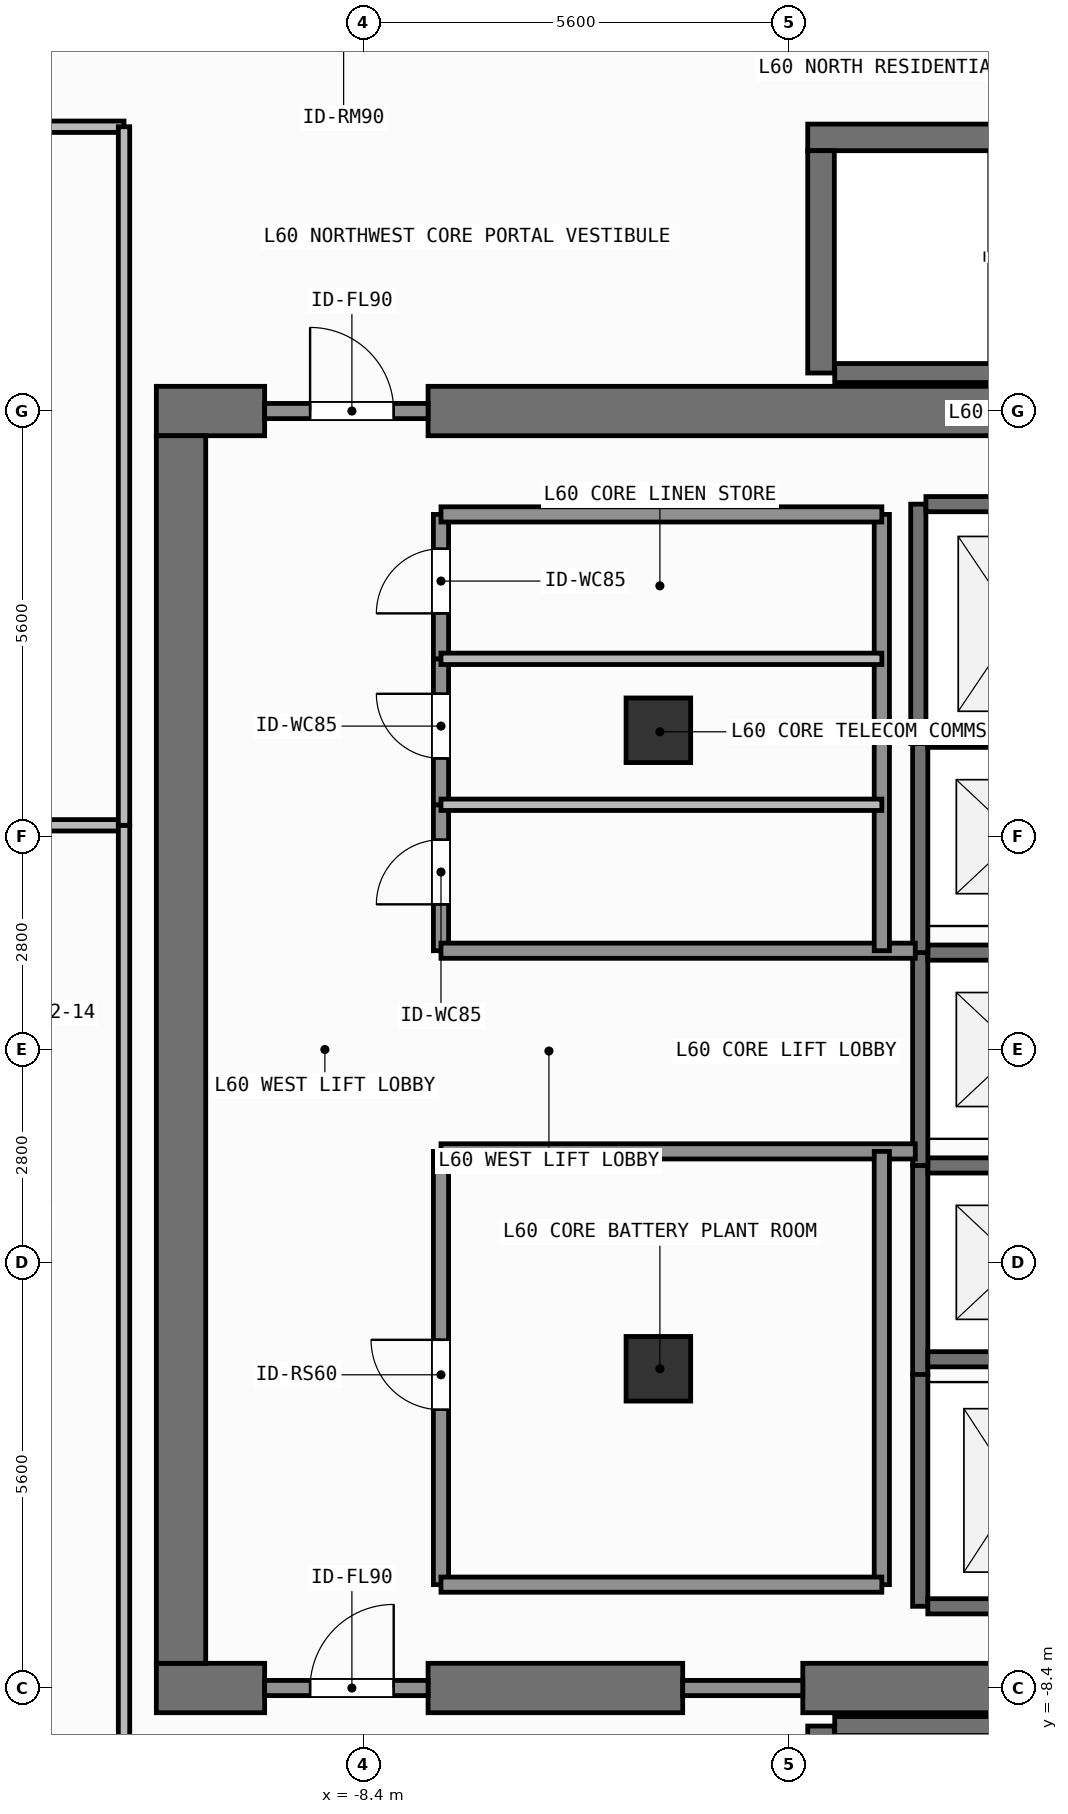
"""IFC4 building model, lengths in metres.
Left out: names, types, materials, properties, quantities, classifications, styles, units other than length and angle.
Written with IfcOpenShell. Run it as: python <this file> out.ifc"""

import sys

from ifc_helpers import new_model, si_unit, direction, frame, frame_2d, origin, origin_2d, place, context, subcontext, project, spatial, rectangle, extrude, element, fill, save


model = new_model("IFC4")
c1 = context("Model", 3, precision=1e-05, world=origin(), true_north=direction((0.0, 1.0)))
c2 = subcontext(c1, "Body", "Model", "MODEL_VIEW")
j1 = project(units=[si_unit("LENGTHUNIT", "METRE"), si_unit("PLANEANGLEUNIT", "RADIAN")], contexts=[c1])
p1 = place(None, origin())
s1 = spatial("IfcSite", under=j1, at=p1, CompositionType="ELEMENT")
p2 = place(p1, origin())
s2 = spatial("IfcBuilding", under=s1, at=p2, CompositionType="ELEMENT")
p3 = place(p2, frame((0.0, 0.0, 246.9)))
s3 = spatial("IfcBuildingStorey", under=s2, at=p3, CompositionType="ELEMENT", Elevation=246.9)
p4 = place(p3, frame((-11.125, -8.4, 0.0), z_axis=(0.0, 0.0, 1.0), x_axis=(1.0, 0.0, 0.0)))
e1 = element("IfcWall", 1, at=p4, inside=s3, PredefinedType="SHEAR", context=c2, shape_type="SweptSolid", body=[
    extrude(rectangle(XDim=1.425, YDim=0.65, at=frame_2d((0.712, 0.0))), origin(), (0.0, 0.0, 1.0), 3.9),
])
p5 = place(p3, frame((-7.55, -8.4, 0.0), z_axis=(0.0, 0.0, 1.0), x_axis=(1.0, 0.0, 0.0)))
e2 = element("IfcWall", 2, at=p5, inside=s3, PredefinedType="SHEAR", context=c2, shape_type="SweptSolid", body=[
    extrude(rectangle(XDim=3.35, YDim=0.65, at=frame_2d((1.675, 0.0))), origin(), (0.0, 0.0, 1.0), 3.9),
])
p6 = place(p3, frame((-2.62, -8.4, 0.0), z_axis=(0.0, 0.0, 1.0), x_axis=(1.0, 0.0, 0.0)))
e3 = element("IfcWall", 3, at=p6, inside=s3, PredefinedType="SHEAR", context=c2, shape_type="SweptSolid", body=[
    extrude(rectangle(XDim=7.27, YDim=0.65, at=frame_2d((3.635, 0.0))), origin(), (0.0, 0.0, 1.0), 3.9),
])
p7 = place(p3, frame((-11.125, 8.4, 0.0), z_axis=(0.0, 0.0, 1.0), x_axis=(1.0, 0.0, 0.0)))
e4 = element("IfcWall", 4, at=p7, inside=s3, PredefinedType="SHEAR", context=c2, shape_type="SweptSolid", body=[
    extrude(rectangle(XDim=1.425, YDim=0.65, at=frame_2d((0.712, 0.0))), origin(), (0.0, 0.0, 1.0), 3.9),
])
p8 = place(p3, frame((-7.55, 8.4, 0.0), z_axis=(0.0, 0.0, 1.0), x_axis=(1.0, 0.0, 0.0)))
e5 = element("IfcWall", 5, at=p8, inside=s3, PredefinedType="SHEAR", context=c2, shape_type="SweptSolid", body=[
    extrude(rectangle(XDim=16.275, YDim=0.65, at=frame_2d((8.138, 0.0))), origin(), (0.0, 0.0, 1.0), 3.9),
])
p9 = place(p3, frame((-10.8, -8.075, 0.0), z_axis=(0.0, 0.0, 1.0), x_axis=(0.0, 1.0, 0.0)))
e6 = element("IfcWall", 6, at=p9, inside=s3, PredefinedType="SHEAR", context=c2, shape_type="SweptSolid", body=[
    extrude(rectangle(XDim=16.15, YDim=0.65, at=frame_2d((8.075, 0.0))), origin(), (0.0, 0.0, 1.0), 3.9),
])
p10 = place(p3, frame((-2.2, -8.9, 0.0), z_axis=(0.0, 0.0, 1.0), x_axis=(1.0, 0.0, 0.0)))
e7 = element("IfcWall", 7, at=p10, inside=s3, PredefinedType="SHEAR", context=c2, shape_type="SweptSolid", body=[
    extrude(rectangle(XDim=6.6, YDim=0.25, at=frame_2d((3.3, 0.0))), origin(), (0.0, 0.0, 1.0), 3.9),
])
p11 = place(p3, frame((-2.38, -11.825, 0.0), z_axis=(0.0, 0.0, 1.0), x_axis=(0.0, 1.0, 0.0)))
e8 = element("IfcWall", 8, at=p11, inside=s3, PredefinedType="SHEAR", context=c2, shape_type="SweptSolid", body=[
    extrude(rectangle(XDim=2.925, YDim=0.35, at=frame_2d((1.462, 0.0))), origin(), (0.0, 0.0, 1.0), 3.9),
])
p12 = place(p3, frame((-2.555, 12.0, 0.0), z_axis=(0.0, 0.0, 1.0), x_axis=(1.0, 0.0, 0.0)))
e9 = element("IfcWall", 9, at=p12, inside=s3, PredefinedType="SHEAR", context=c2, shape_type="SweptSolid", body=[
    extrude(rectangle(XDim=7.31, YDim=0.35, at=frame_2d((3.655, 0.0))), origin(), (0.0, 0.0, 1.0), 3.9),
])
p13 = place(p3, frame((-2.2, 8.9, 0.0), z_axis=(0.0, 0.0, 1.0), x_axis=(1.0, 0.0, 0.0)))
e10 = element("IfcWall", 10, at=p13, inside=s3, PredefinedType="SHEAR", context=c2, shape_type="SweptSolid", body=[
    extrude(rectangle(XDim=6.6, YDim=0.25, at=frame_2d((3.3, 0.0))), origin(), (0.0, 0.0, 1.0), 3.9),
])
p14 = place(p3, frame((-2.38, 8.9, 0.0), z_axis=(0.0, 0.0, 1.0), x_axis=(0.0, 1.0, 0.0)))
e11 = element("IfcWall", 11, at=p14, inside=s3, PredefinedType="SHEAR", context=c2, shape_type="SweptSolid", body=[
    extrude(rectangle(XDim=2.925, YDim=0.35, at=frame_2d((1.462, 0.0))), origin(), (0.0, 0.0, 1.0), 3.9),
])
for number, where, z_axis, x_axis in (
    (12, (-4.52, -4.2, 0.0), (0.0, 0.0, 1.0), (1.0, 0.0, 0.0)),
    (13, (-4.52, 4.2, 0.0), (0.0, 0.0, 1.0), (1.0, 0.0, 0.0)),
):
    element("IfcColumn", number, at=place(p3, frame(where, z_axis=z_axis, x_axis=x_axis)), inside=s3, PredefinedType="COLUMN", context=c2, shape_type="SweptSolid", body=[
        extrude(rectangle(XDim=0.85, YDim=0.85, at=origin_2d()), origin(), (0.0, 0.0, 1.0), 3.9),
    ])
p15 = place(p3, frame((-1.075, -4.275, 0.0), z_axis=(0.0, 0.0, 1.0), x_axis=(0.0, 1.0, 0.0)))
e14 = element("IfcWall", 14, at=p15, inside=s3, PredefinedType="SHEAR", context=c2, shape_type="SweptSolid", body=[
    extrude(rectangle(XDim=2.75, YDim=0.2, at=frame_2d((1.375, 0.0))), origin(), (0.0, 0.0, 1.0), 3.68),
])
for number, where, z_axis, x_axis in (
    (15, (-0.975, -4.075, 0.0), (0.0, 0.0, 1.0), (1.0, 0.0, 0.0)),
    (16, (-0.975, -1.525, 0.0), (0.0, 0.0, 1.0), (1.0, 0.0, 0.0)),
):
    element("IfcWall", number, at=place(p3, frame(where, z_axis=z_axis, x_axis=x_axis)), inside=s3, PredefinedType="SHEAR", context=c2, shape_type="SweptSolid", body=[
        extrude(rectangle(XDim=2.35, YDim=0.2, at=frame_2d((1.175, 0.0))), origin(), (0.0, 0.0, 1.0), 3.68),
    ])
p16 = place(p3, frame((-1.075, -1.525, 0.0), z_axis=(0.0, 0.0, 1.0), x_axis=(0.0, 1.0, 0.0)))
e17 = element("IfcWall", 17, at=p16, inside=s3, PredefinedType="SHEAR", context=c2, shape_type="SweptSolid", body=[
    extrude(rectangle(XDim=2.8, YDim=0.2, at=frame_2d((1.4, 0.0))), origin(), (0.0, 0.0, 1.0), 3.68),
])
p17 = place(p3, frame((-0.975, 1.275, 0.0), z_axis=(0.0, 0.0, 1.0), x_axis=(1.0, 0.0, 0.0)))
e18 = element("IfcWall", 18, at=p17, inside=s3, PredefinedType="SHEAR", context=c2, shape_type="SweptSolid", body=[
    extrude(rectangle(XDim=2.35, YDim=0.2, at=frame_2d((1.175, 0.0))), origin(), (0.0, 0.0, 1.0), 3.68),
])
p18 = place(p3, frame((-1.075, 1.275, 0.0), z_axis=(0.0, 0.0, 1.0), x_axis=(0.0, 1.0, 0.0)))
e19 = element("IfcWall", 19, at=p18, inside=s3, PredefinedType="SHEAR", context=c2, shape_type="SweptSolid", body=[
    extrude(rectangle(XDim=2.8, YDim=0.2, at=frame_2d((1.4, 0.0))), origin(), (0.0, 0.0, 1.0), 3.68),
])
p19 = place(p3, frame((-0.975, 4.075, 0.0), z_axis=(0.0, 0.0, 1.0), x_axis=(1.0, 0.0, 0.0)))
e20 = element("IfcWall", 20, at=p19, inside=s3, PredefinedType="SHEAR", context=c2, shape_type="SweptSolid", body=[
    extrude(rectangle(XDim=2.35, YDim=0.2, at=frame_2d((1.175, 0.0))), origin(), (0.0, 0.0, 1.0), 3.68),
])
p20 = place(p3, frame((-1.1, 4.025, 0.0), z_axis=(0.0, 0.0, 1.0), x_axis=(0.0, 1.0, 0.0)))
e21 = element("IfcWall", 21, at=p20, inside=s3, PredefinedType="SHEAR", context=c2, shape_type="SweptSolid", body=[
    extrude(rectangle(XDim=3.15, YDim=0.2, at=frame_2d((1.575, 0.0))), origin(), (0.0, 0.0, 1.0), 3.68),
])
p21 = place(p3, frame((-1.0, 7.175, 0.0), z_axis=(0.0, 0.0, 1.0), x_axis=(1.0, 0.0, 0.0)))
e22 = element("IfcWall", 22, at=p21, inside=s3, PredefinedType="SHEAR", context=c2, shape_type="SweptSolid", body=[
    extrude(rectangle(XDim=2.4, YDim=0.2, at=frame_2d((1.2, 0.0))), origin(), (0.0, 0.0, 1.0), 3.68),
])
p22 = place(p3, frame((-1.075, -7.325, 0.0), z_axis=(0.0, 0.0, 1.0), x_axis=(0.0, 1.0, 0.0)))
e23 = element("IfcWall", 23, at=p22, inside=s3, PredefinedType="SHEAR", context=c2, shape_type="SweptSolid", body=[
    extrude(rectangle(XDim=3.05, YDim=0.2, at=frame_2d((1.525, 0.0))), origin(), (0.0, 0.0, 1.0), 3.68),
])
p23 = place(p3, frame((-0.975, -7.325, 0.0), z_axis=(0.0, 0.0, 1.0), x_axis=(1.0, 0.0, 0.0)))
e24 = element("IfcWall", 24, at=p23, inside=s3, PredefinedType="SHEAR", context=c2, shape_type="SweptSolid", body=[
    extrude(rectangle(XDim=2.35, YDim=0.2, at=frame_2d((1.175, 0.0))), origin(), (0.0, 0.0, 1.0), 3.68),
])
p24 = place(p3, frame((-9.7, -8.4, 0.0), z_axis=(0.0, 0.0, 1.0), x_axis=(1.0, 0.0, 0.0)))
e25 = element("IfcWall", 25, at=p24, inside=s3, PredefinedType="SOLIDWALL", context=c2, shape_type="SweptSolid", body=[
    extrude(rectangle(XDim=2.15, YDim=0.2, at=frame_2d((1.075, 0.0))), origin(), (0.0, 0.0, 1.0), 2.92),
])
p25 = place(p24, frame((0.598, 0.0, 0.0)))
e26 = element("IfcOpeningElement", 26, at=p25, cuts=e25, PredefinedType="OPENING", context=c2, shape_type="SweptSolid", body=[
    extrude(rectangle(XDim=1.1, YDim=2.15, at=frame_2d((0.55, 1.075))), frame((0.0, 0.11, 0.0), z_axis=(0.0, -1.0, 0.0), x_axis=(1.0, 0.0, 0.0)), (0.0, 0.0, 1.0), 0.22),
])
p26 = place(p3, frame((-9.7, 8.4, 0.0), z_axis=(0.0, 0.0, 1.0), x_axis=(1.0, 0.0, 0.0)))
e27 = element("IfcWall", 27, at=p26, inside=s3, PredefinedType="SOLIDWALL", context=c2, shape_type="SweptSolid", body=[
    extrude(rectangle(XDim=2.15, YDim=0.2, at=frame_2d((1.075, 0.0))), origin(), (0.0, 0.0, 1.0), 2.92),
])
p27 = place(p26, frame((0.598, 0.0, 0.0)))
e28 = element("IfcOpeningElement", 28, at=p27, cuts=e27, PredefinedType="OPENING", context=c2, shape_type="SweptSolid", body=[
    extrude(rectangle(XDim=1.1, YDim=2.15, at=frame_2d((0.55, 1.075))), frame((0.0, 0.11, 0.0), z_axis=(0.0, -1.0, 0.0), x_axis=(1.0, 0.0, 0.0)), (0.0, 0.0, 1.0), 0.22),
])
p28 = place(p3, frame((-7.38, -7.04, 0.0), z_axis=(0.0, 0.0, 1.0), x_axis=(0.0, 1.0, 0.0)))
e29 = element("IfcWall", 29, at=p28, inside=s3, PredefinedType="SOLIDWALL", context=c2, shape_type="SweptSolid", body=[
    extrude(rectangle(XDim=5.7, YDim=0.2, at=frame_2d((2.85, 0.0))), origin(), (0.0, 0.0, 1.0), 3.68),
])
p29 = place(p28, frame((2.301, 0.0, 0.0)))
e30 = element("IfcOpeningElement", 30, at=p29, cuts=e29, PredefinedType="OPENING", context=c2, shape_type="SweptSolid", body=[
    extrude(rectangle(XDim=0.92, YDim=2.1, at=frame_2d((0.46, 1.05))), frame((0.0, 0.11, 0.0), z_axis=(0.0, -1.0, 0.0), x_axis=(1.0, 0.0, 0.0)), (0.0, 0.0, 1.0), 0.22),
])
p30 = place(p3, frame((-7.38, 1.3, 0.0), z_axis=(0.0, 0.0, 1.0), x_axis=(0.0, 1.0, 0.0)))
e31 = element("IfcWall", 31, at=p30, inside=s3, PredefinedType="SOLIDWALL", context=c2, shape_type="SweptSolid", body=[
    extrude(rectangle(XDim=1.92, YDim=0.2, at=frame_2d((0.96, 0.0))), origin(), (0.0, 0.0, 1.0), 3.68),
])
p31 = place(p30, frame((0.61, 0.0, 0.0)))
e32 = element("IfcOpeningElement", 32, at=p31, cuts=e31, PredefinedType="OPENING", context=c2, shape_type="SweptSolid", body=[
    extrude(rectangle(XDim=0.85, YDim=2.1, at=frame_2d((0.425, 1.05))), frame((0.0, 0.11, 0.0), z_axis=(0.0, -1.0, 0.0), x_axis=(1.0, 0.0, 0.0)), (0.0, 0.0, 1.0), 0.22),
])
p32 = place(p3, frame((-7.38, 3.22, 0.0), z_axis=(0.0, 0.0, 1.0), x_axis=(0.0, 1.0, 0.0)))
e33 = element("IfcWall", 33, at=p32, inside=s3, PredefinedType="SOLIDWALL", context=c2, shape_type="SweptSolid", body=[
    extrude(rectangle(XDim=1.92, YDim=0.2, at=frame_2d((0.96, 0.0))), origin(), (0.0, 0.0, 1.0), 3.68),
])
p33 = place(p32, frame((0.61, 0.0, 0.0)))
e34 = element("IfcOpeningElement", 34, at=p33, cuts=e33, PredefinedType="OPENING", context=c2, shape_type="SweptSolid", body=[
    extrude(rectangle(XDim=0.85, YDim=2.1, at=frame_2d((0.425, 1.05))), frame((0.0, 0.11, 0.0), z_axis=(0.0, -1.0, 0.0), x_axis=(1.0, 0.0, 0.0)), (0.0, 0.0, 1.0), 0.22),
])
p34 = place(p3, frame((-7.38, 5.14, 0.0), z_axis=(0.0, 0.0, 1.0), x_axis=(0.0, 1.0, 0.0)))
e35 = element("IfcWall", 35, at=p34, inside=s3, PredefinedType="SOLIDWALL", context=c2, shape_type="SweptSolid", body=[
    extrude(rectangle(XDim=1.9, YDim=0.2, at=frame_2d((0.95, 0.0))), origin(), (0.0, 0.0, 1.0), 3.68),
])
p35 = place(p34, frame((0.598, 0.0, 0.0)))
e36 = element("IfcOpeningElement", 36, at=p35, cuts=e35, PredefinedType="OPENING", context=c2, shape_type="SweptSolid", body=[
    extrude(rectangle(XDim=0.85, YDim=2.1, at=frame_2d((0.425, 1.05))), frame((0.0, 0.11, 0.0), z_axis=(0.0, -1.0, 0.0), x_axis=(1.0, 0.0, 0.0)), (0.0, 0.0, 1.0), 0.22),
])
p36 = place(p3, frame((-17.59, 12.14, 0.0), z_axis=(0.0, 0.0, 1.0), x_axis=(1.0, 0.0, 0.0)))
e37 = element("IfcWall", 37, at=p36, inside=s3, PredefinedType="PARTITIONING", context=c2, shape_type="SweptSolid", body=[
    extrude(rectangle(XDim=6.04, YDim=0.15, at=frame_2d((3.02, 0.0))), origin(), (0.0, 0.0, 1.0), 3.68),
])
p37 = place(p36, frame((2.481, 0.0, 0.0)))
e38 = element("IfcOpeningElement", 38, at=p37, cuts=e37, PredefinedType="OPENING", context=c2, shape_type="SweptSolid", body=[
    extrude(rectangle(XDim=0.9, YDim=2.1, at=frame_2d((0.45, 1.05))), frame((0.0, 0.085, 0.0), z_axis=(0.0, -1.0, 0.0), x_axis=(1.0, 0.0, 0.0)), (0.0, 0.0, 1.0), 0.17),
])
p38 = place(p3, frame((-4.2, -8.4, 0.0), z_axis=(0.0, 0.0, 1.0), x_axis=(1.0, 0.0, 0.0)))
e39 = element("IfcWall", 39, at=p38, inside=s3, PredefinedType="SOLIDWALL", context=c2, shape_type="SweptSolid", body=[
    extrude(rectangle(XDim=1.58, YDim=0.2, at=frame_2d((0.79, 0.0))), origin(), (0.0, 0.0, 1.0), 2.92),
])
for number, where, z_axis, x_axis in (
    (40, (-7.38, -1.34, 0.0), (0.0, 0.0, 1.0), (1.0, 0.0, 0.0)),
    (41, (-7.38, 1.3, 0.0), (0.0, 0.0, 1.0), (1.0, 0.0, 0.0)),
):
    element("IfcWall", number, at=place(p3, frame(where, z_axis=z_axis, x_axis=x_axis)), inside=s3, PredefinedType="SOLIDWALL", context=c2, shape_type="SweptSolid", body=[
        extrude(rectangle(XDim=6.24, YDim=0.2, at=frame_2d((3.12, 0.0))), origin(), (0.0, 0.0, 1.0), 3.68),
    ])
p39 = place(p3, frame((-1.58, -7.04, 0.0), z_axis=(0.0, 0.0, 1.0), x_axis=(0.0, 1.0, 0.0)))
e42 = element("IfcWall", 42, at=p39, inside=s3, PredefinedType="SOLIDWALL", context=c2, shape_type="SweptSolid", body=[
    extrude(rectangle(XDim=5.7, YDim=0.2, at=frame_2d((2.85, 0.0))), origin(), (0.0, 0.0, 1.0), 3.68),
])
p40 = place(p3, frame((-7.38, -7.04, 0.0), z_axis=(0.0, 0.0, 1.0), x_axis=(1.0, 0.0, 0.0)))
e43 = element("IfcWall", 43, at=p40, inside=s3, PredefinedType="SOLIDWALL", context=c2, shape_type="SweptSolid", body=[
    extrude(rectangle(XDim=5.8, YDim=0.2, at=frame_2d((2.9, 0.0))), origin(), (0.0, 0.0, 1.0), 3.68),
])
p41 = place(p3, frame((-1.58, 1.3, 0.0), z_axis=(0.0, 0.0, 1.0), x_axis=(0.0, 1.0, 0.0)))
e44 = element("IfcWall", 44, at=p41, inside=s3, PredefinedType="SOLIDWALL", context=c2, shape_type="SweptSolid", body=[
    extrude(rectangle(XDim=5.74, YDim=0.2, at=frame_2d((2.87, 0.0))), origin(), (0.0, 0.0, 1.0), 3.68),
])
p42 = place(p3, frame((-7.38, 7.04, 0.0), z_axis=(0.0, 0.0, 1.0), x_axis=(1.0, 0.0, 0.0)))
e45 = element("IfcWall", 45, at=p42, inside=s3, PredefinedType="SOLIDWALL", context=c2, shape_type="SweptSolid", body=[
    extrude(rectangle(XDim=5.8, YDim=0.2, at=frame_2d((2.9, 0.0))), origin(), (0.0, 0.0, 1.0), 3.68),
])
for number, where, z_axis, x_axis in (
    (46, (-7.38, 3.22, 0.0), (0.0, 0.0, 1.0), (1.0, 0.0, 0.0)),
    (47, (-7.38, 5.14, 0.0), (0.0, 0.0, 1.0), (1.0, 0.0, 0.0)),
):
    element("IfcWall", number, at=place(p3, frame(where, z_axis=z_axis, x_axis=x_axis)), inside=s3, PredefinedType="PARTITIONING", context=c2, shape_type="SweptSolid", body=[
        extrude(rectangle(XDim=5.8, YDim=0.15, at=frame_2d((2.9, 0.0))), origin(), (0.0, 0.0, 1.0), 3.68),
    ])
p43 = place(p3, frame((-18.33, 2.95, 0.0), z_axis=(0.0, 0.0, 1.0), x_axis=(1.0, 0.0, 0.0)))
e48 = element("IfcWall", 48, at=p43, inside=s3, PredefinedType="PARTITIONING", context=c2, shape_type="SweptSolid", body=[
    extrude(rectangle(XDim=6.78, YDim=0.15, at=frame_2d((3.39, 0.0))), origin(), (0.0, 0.0, 1.0), 3.68),
])
p44 = place(p3, frame((-11.55, -12.14, 0.0), z_axis=(0.0, 0.0, 1.0), x_axis=(0.0, 1.0, 0.0)))
e49 = element("IfcWall", 49, at=p44, inside=s3, PredefinedType="PARTITIONING", context=c2, shape_type="SweptSolid", body=[
    extrude(rectangle(XDim=15.09, YDim=0.15, at=frame_2d((7.545, 0.0))), origin(), (0.0, 0.0, 1.0), 3.68),
])
p45 = place(p3, frame((-11.55, 2.95, 0.0), z_axis=(0.0, 0.0, 1.0), x_axis=(0.0, 1.0, 0.0)))
e50 = element("IfcWall", 50, at=p45, inside=s3, PredefinedType="PARTITIONING", context=c2, shape_type="SweptSolid", body=[
    extrude(rectangle(XDim=9.19, YDim=0.15, at=frame_2d((4.595, 0.0))), origin(), (0.0, 0.0, 1.0), 3.68),
])
p46 = place(p25, origin())
e51 = element("IfcDoor", 51, at=p46, inside=s3, OperationType="SINGLE_SWING_RIGHT", PredefinedType="DOOR", context=c2, shape_type="SweptSolid", body=[
    extrude(rectangle(XDim=1.1, YDim=2.15, at=frame_2d((0.55, 1.075))), frame((0.0, 0.025, 0.0), z_axis=(0.0, -1.0, 0.0), x_axis=(1.0, 0.0, 0.0)), (0.0, 0.0, 1.0), 0.05),
])
fill(e26, e51)
p47 = place(p27, origin())
e52 = element("IfcDoor", 52, at=p47, inside=s3, OperationType="SINGLE_SWING_LEFT", PredefinedType="DOOR", context=c2, shape_type="SweptSolid", body=[
    extrude(rectangle(XDim=1.1, YDim=2.15, at=frame_2d((0.55, 1.075))), frame((0.0, 0.025, 0.0), z_axis=(0.0, -1.0, 0.0), x_axis=(1.0, 0.0, 0.0)), (0.0, 0.0, 1.0), 0.05),
])
fill(e28, e52)
p48 = place(p29, origin())
e53 = element("IfcDoor", 53, at=p48, inside=s3, OperationType="SINGLE_SWING_RIGHT", PredefinedType="DOOR", context=c2, shape_type="SweptSolid", body=[
    extrude(rectangle(XDim=0.92, YDim=2.1, at=frame_2d((0.46, 1.05))), frame((0.0, 0.025, 0.0), z_axis=(0.0, -1.0, 0.0), x_axis=(1.0, 0.0, 0.0)), (0.0, 0.0, 1.0), 0.05),
])
fill(e30, e53)
p49 = place(p31, origin())
e54 = element("IfcDoor", 54, at=p49, inside=s3, OperationType="SINGLE_SWING_LEFT", PredefinedType="DOOR", context=c2, shape_type="SweptSolid", body=[
    extrude(rectangle(XDim=0.85, YDim=2.1, at=frame_2d((0.425, 1.05))), frame((0.0, 0.025, 0.0), z_axis=(0.0, -1.0, 0.0), x_axis=(1.0, 0.0, 0.0)), (0.0, 0.0, 1.0), 0.05),
])
fill(e32, e54)
p50 = place(p33, origin())
e55 = element("IfcDoor", 55, at=p50, inside=s3, OperationType="SINGLE_SWING_RIGHT", PredefinedType="DOOR", context=c2, shape_type="SweptSolid", body=[
    extrude(rectangle(XDim=0.85, YDim=2.1, at=frame_2d((0.425, 1.05))), frame((0.0, 0.025, 0.0), z_axis=(0.0, -1.0, 0.0), x_axis=(1.0, 0.0, 0.0)), (0.0, 0.0, 1.0), 0.05),
])
fill(e34, e55)
p51 = place(p35, origin())
e56 = element("IfcDoor", 56, at=p51, inside=s3, OperationType="SINGLE_SWING_LEFT", PredefinedType="DOOR", context=c2, shape_type="SweptSolid", body=[
    extrude(rectangle(XDim=0.85, YDim=2.1, at=frame_2d((0.425, 1.05))), frame((0.0, 0.025, 0.0), z_axis=(0.0, -1.0, 0.0), x_axis=(1.0, 0.0, 0.0)), (0.0, 0.0, 1.0), 0.05),
])
fill(e36, e56)
save(model, sys.argv[1])
